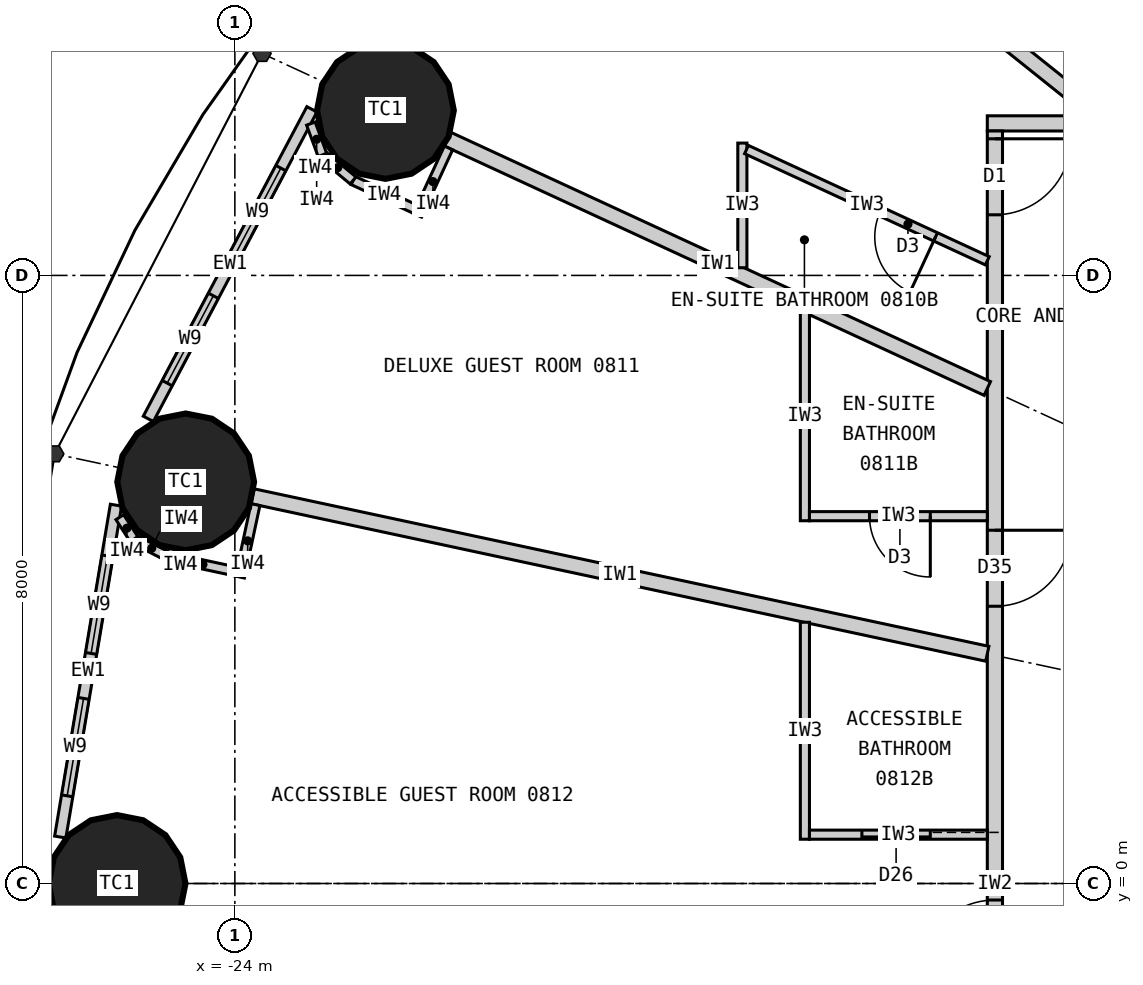
"""IFC4 building model, lengths in metres.
Left out: names, types, materials, properties, quantities, classifications, styles, units other than length and angle.
Written with IfcOpenShell. Run it as: python <this file> out.ifc"""

import sys

from ifc_helpers import new_model, si_unit, direction, frame, frame_2d, origin, origin_2d, place, context, subcontext, project, spatial, rectangle, circle, extrude, element, fill, save


model = new_model("IFC4")
c1 = context("Model", 3, precision=1e-05, world=origin(), true_north=direction((0.0, 1.0)))
c2 = subcontext(c1, "Body", "Model", "MODEL_VIEW")
j1 = project(units=[si_unit("LENGTHUNIT", "METRE"), si_unit("PLANEANGLEUNIT", "RADIAN")], contexts=[c1])
p1 = place(None, origin())
s1 = spatial("IfcSite", under=j1, at=p1, CompositionType="ELEMENT")
p2 = place(p1, origin())
s2 = spatial("IfcBuilding", under=s1, at=p2, CompositionType="ELEMENT")
p3 = place(p2, frame((0.0, 0.0, 39.3)))
s3 = spatial("IfcBuildingStorey", under=s2, at=p3, CompositionType="ELEMENT", Elevation=39.3)
for number, where, z_axis, x_axis in (
    (1, (-22.019, 10.17, 0.0), (0.0, 0.0, 1.0), (1.0, 0.0, 0.0)),
    (2, (-24.647, 5.283, 0.0), (0.0, 0.0, 1.0), (1.0, 0.0, 0.0)),
    (3, (-25.55, 0.0, 0.0), (0.0, 0.0, 1.0), (1.0, 0.0, 0.0)),
):
    element("IfcColumn", number, at=place(p3, frame(where, z_axis=z_axis, x_axis=x_axis)), inside=s3, PredefinedType="COLUMN", context=c2, shape_type="SweptSolid", body=[
        extrude(circle(Radius=0.9, at=origin_2d()), origin(), (0.0, 0.0, 1.0), 3.3),
    ])
p4 = place(p3, frame((-22.986, 10.185, 0.0), z_axis=(0.0, 0.0, 1.0), x_axis=(-0.467303182954, -0.884097129959, 0.0)))
e4 = element("IfcWall", 4, at=p4, inside=s3, PredefinedType="ELEMENTEDWALL", context=c2, shape_type="SweptSolid", body=[
    extrude(rectangle(XDim=4.606, YDim=0.15, at=frame_2d((2.303, 0.0))), origin(), (0.0, 0.0, 1.0), 3.12),
])
p5 = place(p4, frame((0.875, 0.0, 0.9)))
e5 = element("IfcOpeningElement", 5, at=p5, cuts=e4, PredefinedType="OPENING", context=c2, shape_type="SweptSolid", body=[
    extrude(rectangle(XDim=1.3, YDim=1.9, at=frame_2d((0.65, 0.95))), frame((0.0, 0.085, 0.0), z_axis=(0.0, -1.0, 0.0), x_axis=(1.0, 0.0, 0.0)), (0.0, 0.0, 1.0), 0.17),
])
p6 = place(p4, frame((2.775, 0.0, 0.9)))
e6 = element("IfcOpeningElement", 6, at=p6, cuts=e4, PredefinedType="OPENING", context=c2, shape_type="SweptSolid", body=[
    extrude(rectangle(XDim=1.3, YDim=1.9, at=frame_2d((0.65, 0.95))), frame((0.0, 0.085, 0.0), z_axis=(0.0, -1.0, 0.0), x_axis=(1.0, 0.0, 0.0)), (0.0, 0.0, 1.0), 0.17),
])
p7 = place(p3, frame((-25.564, 4.978, 0.0), z_axis=(0.0, 0.0, 1.0), x_axis=(-0.165641751141, -0.986185991727, 0.0)))
e7 = element("IfcWall", 7, at=p7, inside=s3, PredefinedType="ELEMENTEDWALL", context=c2, shape_type="SweptSolid", body=[
    extrude(rectangle(XDim=4.428, YDim=0.15, at=frame_2d((2.214, 0.0))), origin(), (0.0, 0.0, 1.0), 3.12),
])
p8 = place(p7, frame((0.678, 0.0, 0.9)))
e8 = element("IfcOpeningElement", 8, at=p8, cuts=e7, PredefinedType="OPENING", context=c2, shape_type="SweptSolid", body=[
    extrude(rectangle(XDim=1.3, YDim=1.9, at=frame_2d((0.65, 0.95))), frame((0.0, 0.085, 0.0), z_axis=(0.0, -1.0, 0.0), x_axis=(1.0, 0.0, 0.0)), (0.0, 0.0, 1.0), 0.17),
])
p9 = place(p7, frame((2.578, 0.0, 0.9)))
e9 = element("IfcOpeningElement", 9, at=p9, cuts=e7, PredefinedType="OPENING", context=c2, shape_type="SweptSolid", body=[
    extrude(rectangle(XDim=1.3, YDim=1.9, at=frame_2d((0.65, 0.95))), frame((0.0, 0.085, 0.0), z_axis=(0.0, -1.0, 0.0), x_axis=(1.0, 0.0, 0.0)), (0.0, 0.0, 1.0), 0.17),
])
p10 = place(p3, frame((-14.1, 10.0, 0.0), z_axis=(0.0, 0.0, 1.0), x_axis=(1.0, 0.0, 0.0)))
e10 = element("IfcWall", 10, at=p10, inside=s3, PredefinedType="PARTITIONING", context=c2, shape_type="SweptSolid", body=[
    extrude(rectangle(XDim=28.2, YDim=0.2, at=frame_2d((14.1, 0.0))), origin(), (0.0, 0.0, 1.0), 3.12),
])
p11 = place(p10, frame((23.477, 0.0, 0.0)))
e11 = element("IfcOpeningElement", 11, at=p11, cuts=e10, PredefinedType="OPENING", context=c2, shape_type="SweptSolid", body=[
    extrude(rectangle(XDim=1.0, YDim=2.2, at=frame_2d((0.5, 1.1))), frame((0.0, 0.11, 0.0), z_axis=(0.0, -1.0, 0.0), x_axis=(1.0, 0.0, 0.0)), (0.0, 0.0, 1.0), 0.22),
])
p12 = place(p10, frame((18.529, 0.0, 0.0)))
e12 = element("IfcOpeningElement", 12, at=p12, cuts=e10, PredefinedType="OPENING", context=c2, shape_type="SweptSolid", body=[
    extrude(rectangle(XDim=1.0, YDim=2.2, at=frame_2d((0.5, 1.1))), frame((0.0, 0.11, 0.0), z_axis=(0.0, -1.0, 0.0), x_axis=(1.0, 0.0, 0.0)), (0.0, 0.0, 1.0), 0.22),
])
p13 = place(p10, frame((14.623, 0.0, 0.0)))
e13 = element("IfcOpeningElement", 13, at=p13, cuts=e10, PredefinedType="OPENING", context=c2, shape_type="SweptSolid", body=[
    extrude(rectangle(XDim=1.0, YDim=2.2, at=frame_2d((0.5, 1.1))), frame((0.0, 0.11, 0.0), z_axis=(0.0, -1.0, 0.0), x_axis=(1.0, 0.0, 0.0)), (0.0, 0.0, 1.0), 0.22),
])
p14 = place(p10, frame((11.252, 0.0, 0.0)))
e14 = element("IfcOpeningElement", 14, at=p14, cuts=e10, PredefinedType="OPENING", context=c2, shape_type="SweptSolid", body=[
    extrude(rectangle(XDim=1.0, YDim=2.1, at=frame_2d((0.5, 1.05))), frame((0.0, 0.11, 0.0), z_axis=(0.0, -1.0, 0.0), x_axis=(1.0, 0.0, 0.0)), (0.0, 0.0, 1.0), 0.22),
])
p15 = place(p10, frame((8.671, 0.0, 0.0)))
e15 = element("IfcOpeningElement", 15, at=p15, cuts=e10, PredefinedType="OPENING", context=c2, shape_type="SweptSolid", body=[
    extrude(rectangle(XDim=1.0, YDim=2.2, at=frame_2d((0.5, 1.1))), frame((0.0, 0.11, 0.0), z_axis=(0.0, -1.0, 0.0), x_axis=(1.0, 0.0, 0.0)), (0.0, 0.0, 1.0), 0.22),
])
p16 = place(p10, frame((1.616, 0.0, 0.0)))
e16 = element("IfcOpeningElement", 16, at=p16, cuts=e10, PredefinedType="OPENING", context=c2, shape_type="SweptSolid", body=[
    extrude(rectangle(XDim=1.0, YDim=2.2, at=frame_2d((0.5, 1.1))), frame((0.0, 0.11, 0.0), z_axis=(0.0, -1.0, 0.0), x_axis=(1.0, 0.0, 0.0)), (0.0, 0.0, 1.0), 0.22),
])
p17 = place(p3, frame((-14.0, 9.9, 0.0), z_axis=(0.0, 0.0, 1.0), x_axis=(0.0, -1.0, 0.0)))
e17 = element("IfcWall", 17, at=p17, inside=s3, PredefinedType="PARTITIONING", context=c2, shape_type="SweptSolid", body=[
    extrude(rectangle(XDim=19.8, YDim=0.2, at=frame_2d((9.9, 0.0))), origin(), (0.0, 0.0, 1.0), 3.12),
])
p18 = place(p17, frame((0.103, 0.0, 0.0)))
e18 = element("IfcOpeningElement", 18, at=p18, cuts=e17, PredefinedType="OPENING", context=c2, shape_type="SweptSolid", body=[
    extrude(rectangle(XDim=1.0, YDim=2.2, at=frame_2d((0.5, 1.1))), frame((0.0, 0.11, 0.0), z_axis=(0.0, -1.0, 0.0), x_axis=(1.0, 0.0, 0.0)), (0.0, 0.0, 1.0), 0.22),
])
p19 = place(p17, frame((5.252, 0.0, 0.0)))
e19 = element("IfcOpeningElement", 19, at=p19, cuts=e17, PredefinedType="OPENING", context=c2, shape_type="SweptSolid", body=[
    extrude(rectangle(XDim=1.0, YDim=2.0, at=frame_2d((0.5, 1.0))), frame((0.0, 0.11, 0.0), z_axis=(0.0, -1.0, 0.0), x_axis=(1.0, 0.0, 0.0)), (0.0, 0.0, 1.0), 0.22),
])
p20 = place(p17, frame((10.117, 0.0, 0.0)))
e20 = element("IfcOpeningElement", 20, at=p20, cuts=e17, PredefinedType="OPENING", context=c2, shape_type="SweptSolid", body=[
    extrude(rectangle(XDim=1.0, YDim=2.2, at=frame_2d((0.5, 1.1))), frame((0.0, 0.11, 0.0), z_axis=(0.0, -1.0, 0.0), x_axis=(1.0, 0.0, 0.0)), (0.0, 0.0, 1.0), 0.22),
])
p21 = place(p17, frame((13.247, 0.0, 0.0)))
e21 = element("IfcOpeningElement", 21, at=p21, cuts=e17, PredefinedType="OPENING", context=c2, shape_type="SweptSolid", body=[
    extrude(rectangle(XDim=1.0, YDim=2.0, at=frame_2d((0.5, 1.0))), frame((0.0, 0.11, 0.0), z_axis=(0.0, -1.0, 0.0), x_axis=(1.0, 0.0, 0.0)), (0.0, 0.0, 1.0), 0.22),
])
p22 = place(p17, frame((15.679, 0.0, 0.0)))
e22 = element("IfcOpeningElement", 22, at=p22, cuts=e17, PredefinedType="OPENING", context=c2, shape_type="SweptSolid", body=[
    extrude(rectangle(XDim=1.0, YDim=2.2, at=frame_2d((0.5, 1.1))), frame((0.0, 0.11, 0.0), z_axis=(0.0, -1.0, 0.0), x_axis=(1.0, 0.0, 0.0)), (0.0, 0.0, 1.0), 0.22),
])
p23 = place(p3, frame((-12.625, 10.1, 0.0), z_axis=(0.0, 0.0, 1.0), x_axis=(-0.780872884676, 0.624689953479, 0.0)))
e23 = element("IfcWall", 23, at=p23, inside=s3, PredefinedType="PARTITIONING", context=c2, shape_type="SweptSolid", body=[
    extrude(rectangle(XDim=5.845, YDim=0.2, at=frame_2d((2.922, 0.0))), origin(), (0.0, 0.0, 1.0), 2.32),
])
p24 = place(p3, frame((-14.1, 6.512, 0.0), z_axis=(0.0, 0.0, 1.0), x_axis=(-0.907842433118, 0.41931147925, 0.0)))
e24 = element("IfcWall", 24, at=p24, inside=s3, PredefinedType="PARTITIONING", context=c2, shape_type="SweptSolid", body=[
    extrude(rectangle(XDim=7.823, YDim=0.2, at=frame_2d((3.912, 0.0))), origin(), (0.0, 0.0, 1.0), 2.32),
])
p25 = place(p3, frame((-14.1, 3.022, 0.0), z_axis=(0.0, 0.0, 1.0), x_axis=(-0.977786510688, 0.209603290805, 0.0)))
e25 = element("IfcWall", 25, at=p25, inside=s3, PredefinedType="PARTITIONING", context=c2, shape_type="SweptSolid", body=[
    extrude(rectangle(XDim=9.887, YDim=0.2, at=frame_2d((4.943, 0.0))), origin(), (0.0, 0.0, 1.0), 2.32),
])
p26 = place(p3, frame((-17.323, 8.101, 0.0), z_axis=(0.0, 0.0, 1.0), x_axis=(0.0, 1.0, 0.0)))
e26 = element("IfcWall", 26, at=p26, inside=s3, PredefinedType="PARTITIONING", context=c2, shape_type="SweptSolid", body=[
    extrude(rectangle(XDim=1.64, YDim=0.12, at=frame_2d((0.82, 0.0))), origin(), (0.0, 0.0, 1.0), 3.12),
])
p27 = place(p3, frame((-14.1, 8.193, 0.0), z_axis=(0.0, 0.0, 1.0), x_axis=(-0.907836493557, 0.419324338628, 0.0)))
e27 = element("IfcWall", 27, at=p27, inside=s3, PredefinedType="PARTITIONING", context=c2, shape_type="SweptSolid", body=[
    extrude(rectangle(XDim=3.49, YDim=0.12, at=frame_2d((1.745, 0.0))), origin(), (0.0, 0.0, 1.0), 3.12),
])
p28 = place(p27, frame((0.75, 0.0, 0.0)))
e28 = element("IfcOpeningElement", 28, at=p28, cuts=e27, PredefinedType="OPENING", context=c2, shape_type="SweptSolid", body=[
    extrude(rectangle(XDim=0.8, YDim=2.1, at=frame_2d((0.4, 1.05))), frame((0.0, 0.07, 0.0), z_axis=(0.0, -1.0, 0.0), x_axis=(1.0, 0.0, 0.0)), (0.0, 0.0, 1.0), 0.14),
])
p29 = place(p3, frame((-16.5, 7.521, 0.0), z_axis=(0.0, 0.0, 1.0), x_axis=(0.0, -1.0, 0.0)))
e29 = element("IfcWall", 29, at=p29, inside=s3, PredefinedType="PARTITIONING", context=c2, shape_type="SweptSolid", body=[
    extrude(rectangle(XDim=2.749, YDim=0.12, at=frame_2d((1.374, 0.0))), origin(), (0.0, 0.0, 1.0), 3.12),
])
p30 = place(p3, frame((-14.1, 4.833, 0.0), z_axis=(0.0, 0.0, 1.0), x_axis=(-1.0, 0.0, 0.0)))
e30 = element("IfcWall", 30, at=p30, inside=s3, PredefinedType="PARTITIONING", context=c2, shape_type="SweptSolid", body=[
    extrude(rectangle(XDim=2.34, YDim=0.12, at=frame_2d((1.17, 0.0))), origin(), (0.0, 0.0, 1.0), 3.12),
])
p31 = place(p30, frame((0.75, 0.0, 0.0)))
e31 = element("IfcOpeningElement", 31, at=p31, cuts=e30, PredefinedType="OPENING", context=c2, shape_type="SweptSolid", body=[
    extrude(rectangle(XDim=0.8, YDim=2.1, at=frame_2d((0.4, 1.05))), frame((0.0, 0.07, 0.0), z_axis=(0.0, -1.0, 0.0), x_axis=(1.0, 0.0, 0.0)), (0.0, 0.0, 1.0), 0.14),
])
p32 = place(p3, frame((-16.5, 3.437, 0.0), z_axis=(0.0, 0.0, 1.0), x_axis=(0.0, -1.0, 0.0)))
e32 = element("IfcWall", 32, at=p32, inside=s3, PredefinedType="PARTITIONING", context=c2, shape_type="SweptSolid", body=[
    extrude(rectangle(XDim=2.854, YDim=0.12, at=frame_2d((1.427, 0.0))), origin(), (0.0, 0.0, 1.0), 3.12),
])
p33 = place(p3, frame((-14.1, 0.643, 0.0), z_axis=(0.0, 0.0, 1.0), x_axis=(-1.0, 0.0, 0.0)))
e33 = element("IfcWall", 33, at=p33, inside=s3, PredefinedType="PARTITIONING", context=c2, shape_type="SweptSolid", body=[
    extrude(rectangle(XDim=2.34, YDim=0.12, at=frame_2d((1.17, 0.0))), origin(), (0.0, 0.0, 1.0), 3.12),
])
p34 = place(p33, frame((0.75, 0.0, 0.0)))
e34 = element("IfcOpeningElement", 34, at=p34, cuts=e33, PredefinedType="OPENING", context=c2, shape_type="SweptSolid", body=[
    extrude(rectangle(XDim=0.9, YDim=2.1, at=frame_2d((0.45, 1.05))), frame((0.0, 0.07, 0.0), z_axis=(0.0, -1.0, 0.0), x_axis=(1.0, 0.0, 0.0)), (0.0, 0.0, 1.0), 0.14),
])
p35 = place(p3, frame((-21.189, 9.677, 0.0), z_axis=(0.0, 0.0, 1.0), x_axis=(-0.419344098106, -0.907827366509, 0.0)))
e35 = element("IfcWall", 35, at=p35, inside=s3, PredefinedType="PARTITIONING", context=c2, shape_type="SweptSolid", body=[
    extrude(rectangle(XDim=0.975, YDim=0.12, at=frame_2d((0.487, 0.0))), origin(), (0.0, 0.0, 1.0), 3.12),
])
p36 = place(p3, frame((-21.627, 8.872, 0.0), z_axis=(0.0, 0.0, 1.0), x_axis=(-0.907935564339, 0.419109783957, 0.0)))
e36 = element("IfcWall", 36, at=p36, inside=s3, PredefinedType="PARTITIONING", context=c2, shape_type="SweptSolid", body=[
    extrude(rectangle(XDim=0.9, YDim=0.12, at=frame_2d((0.45, 0.0))), origin(), (0.0, 0.0, 1.0), 3.12),
])
p37 = place(p3, frame((-22.445, 9.249, 0.0), z_axis=(0.0, 0.0, 1.0), x_axis=(-0.768335565584, 0.640047231584, 0.0)))
e37 = element("IfcWall", 37, at=p37, inside=s3, PredefinedType="PARTITIONING", context=c2, shape_type="SweptSolid", body=[
    extrude(rectangle(XDim=0.525, YDim=0.12, at=frame_2d((0.263, 0.0))), origin(), (0.0, 0.0, 1.0), 3.12),
])
p38 = place(p3, frame((-22.848, 9.585, 0.0), z_axis=(0.0, 0.0, 1.0), x_axis=(-0.345267312673, 0.938504386138, 0.0)))
e38 = element("IfcWall", 38, at=p38, inside=s3, PredefinedType="PARTITIONING", context=c2, shape_type="SweptSolid", body=[
    extrude(rectangle(XDim=0.439, YDim=0.12, at=frame_2d((0.22, 0.0))), origin(), (0.0, 0.0, 1.0), 3.12),
])
p39 = place(p3, frame((-23.729, 4.984, 0.0), z_axis=(0.0, 0.0, 1.0), x_axis=(-0.20968306268, -0.977769406979, 0.0)))
e39 = element("IfcWall", 39, at=p39, inside=s3, PredefinedType="PARTITIONING", context=c2, shape_type="SweptSolid", body=[
    extrude(rectangle(XDim=0.975, YDim=0.12, at=frame_2d((0.487, 0.0))), origin(), (0.0, 0.0, 1.0), 3.12),
])
p40 = place(p3, frame((-23.98, 4.103, 0.0), z_axis=(0.0, 0.0, 1.0), x_axis=(-0.977762694187, 0.209714362543, 0.0)))
e40 = element("IfcWall", 40, at=p40, inside=s3, PredefinedType="PARTITIONING", context=c2, shape_type="SweptSolid", body=[
    extrude(rectangle(XDim=0.9, YDim=0.12, at=frame_2d((0.45, 0.0))), origin(), (0.0, 0.0, 1.0), 3.12),
])
p41 = place(p3, frame((-24.86, 4.291, 0.0), z_axis=(0.0, 0.0, 1.0), x_axis=(-0.890204323062, 0.455561481254, 0.0)))
e41 = element("IfcWall", 41, at=p41, inside=s3, PredefinedType="PARTITIONING", context=c2, shape_type="SweptSolid", body=[
    extrude(rectangle(XDim=0.525, YDim=0.12, at=frame_2d((0.263, 0.0))), origin(), (0.0, 0.0, 1.0), 3.12),
])
p42 = place(p3, frame((-25.327, 4.531, 0.0), z_axis=(0.0, 0.0, 1.0), x_axis=(-0.543516034791, 0.839398784801, 0.0)))
e42 = element("IfcWall", 42, at=p42, inside=s3, PredefinedType="PARTITIONING", context=c2, shape_type="SweptSolid", body=[
    extrude(rectangle(XDim=0.344, YDim=0.12, at=frame_2d((0.172, 0.0))), origin(), (0.0, 0.0, 1.0), 3.12),
])
p43 = place(p5, origin())
e43 = element("IfcWindow", 43, at=p43, inside=s3, PartitioningType="SINGLE_PANEL", PredefinedType="WINDOW", context=c2, shape_type="SweptSolid", body=[
    extrude(rectangle(XDim=1.3, YDim=1.9, at=frame_2d((0.65, 0.95))), frame((0.0, 0.03, 0.0), z_axis=(0.0, -1.0, 0.0), x_axis=(1.0, 0.0, 0.0)), (0.0, 0.0, 1.0), 0.06),
])
fill(e5, e43)
p44 = place(p6, origin())
e44 = element("IfcWindow", 44, at=p44, inside=s3, PartitioningType="SINGLE_PANEL", PredefinedType="WINDOW", context=c2, shape_type="SweptSolid", body=[
    extrude(rectangle(XDim=1.3, YDim=1.9, at=frame_2d((0.65, 0.95))), frame((0.0, 0.03, 0.0), z_axis=(0.0, -1.0, 0.0), x_axis=(1.0, 0.0, 0.0)), (0.0, 0.0, 1.0), 0.06),
])
fill(e6, e44)
p45 = place(p8, origin())
e45 = element("IfcWindow", 45, at=p45, inside=s3, PartitioningType="SINGLE_PANEL", PredefinedType="WINDOW", context=c2, shape_type="SweptSolid", body=[
    extrude(rectangle(XDim=1.3, YDim=1.9, at=frame_2d((0.65, 0.95))), frame((0.0, 0.03, 0.0), z_axis=(0.0, -1.0, 0.0), x_axis=(1.0, 0.0, 0.0)), (0.0, 0.0, 1.0), 0.06),
])
fill(e8, e45)
p46 = place(p9, origin())
e46 = element("IfcWindow", 46, at=p46, inside=s3, PartitioningType="SINGLE_PANEL", PredefinedType="WINDOW", context=c2, shape_type="SweptSolid", body=[
    extrude(rectangle(XDim=1.3, YDim=1.9, at=frame_2d((0.65, 0.95))), frame((0.0, 0.03, 0.0), z_axis=(0.0, -1.0, 0.0), x_axis=(1.0, 0.0, 0.0)), (0.0, 0.0, 1.0), 0.06),
])
fill(e9, e46)
p47 = place(p28, origin())
e47 = element("IfcDoor", 47, at=p47, inside=s3, OperationType="SINGLE_SWING_LEFT", PredefinedType="DOOR", context=c2, shape_type="SweptSolid", body=[
    extrude(rectangle(XDim=0.8, YDim=2.1, at=frame_2d((0.4, 1.05))), frame((0.0, 0.025, 0.0), z_axis=(0.0, -1.0, 0.0), x_axis=(1.0, 0.0, 0.0)), (0.0, 0.0, 1.0), 0.05),
])
fill(e28, e47)
p48 = place(p18, origin())
e48 = element("IfcDoor", 48, at=p48, inside=s3, OperationType="SINGLE_SWING_LEFT", PredefinedType="DOOR", context=c2, shape_type="SweptSolid", body=[
    extrude(rectangle(XDim=1.0, YDim=2.2, at=frame_2d((0.5, 1.1))), frame((0.0, 0.025, 0.0), z_axis=(0.0, -1.0, 0.0), x_axis=(1.0, 0.0, 0.0)), (0.0, 0.0, 1.0), 0.05),
])
fill(e18, e48)
p49 = place(p31, origin())
e49 = element("IfcDoor", 49, at=p49, inside=s3, OperationType="SINGLE_SWING_LEFT", PredefinedType="DOOR", context=c2, shape_type="SweptSolid", body=[
    extrude(rectangle(XDim=0.8, YDim=2.1, at=frame_2d((0.4, 1.05))), frame((0.0, 0.025, 0.0), z_axis=(0.0, -1.0, 0.0), x_axis=(1.0, 0.0, 0.0)), (0.0, 0.0, 1.0), 0.05),
])
fill(e31, e49)
p50 = place(p19, origin())
e50 = element("IfcDoor", 50, at=p50, inside=s3, OperationType="SINGLE_SWING_LEFT", PredefinedType="DOOR", context=c2, shape_type="SweptSolid", body=[
    extrude(rectangle(XDim=1.0, YDim=2.0, at=frame_2d((0.5, 1.0))), frame((0.0, 0.025, 0.0), z_axis=(0.0, -1.0, 0.0), x_axis=(1.0, 0.0, 0.0)), (0.0, 0.0, 1.0), 0.05),
])
fill(e19, e50)
p51 = place(p34, origin())
e51 = element("IfcDoor", 51, at=p51, inside=s3, OperationType="SLIDING_TO_LEFT", PredefinedType="DOOR", context=c2, shape_type="SweptSolid", body=[
    extrude(rectangle(XDim=0.9, YDim=2.1, at=frame_2d((0.45, 1.05))), frame((0.0, 0.025, 0.0), z_axis=(0.0, -1.0, 0.0), x_axis=(1.0, 0.0, 0.0)), (0.0, 0.0, 1.0), 0.05),
])
fill(e34, e51)
p52 = place(p20, origin())
e52 = element("IfcDoor", 52, at=p52, inside=s3, OperationType="SINGLE_SWING_RIGHT", PredefinedType="DOOR", context=c2, shape_type="SweptSolid", body=[
    extrude(rectangle(XDim=1.0, YDim=2.2, at=frame_2d((0.5, 1.1))), frame((0.0, 0.025, 0.0), z_axis=(0.0, -1.0, 0.0), x_axis=(1.0, 0.0, 0.0)), (0.0, 0.0, 1.0), 0.05),
])
fill(e20, e52)
save(model, sys.argv[1])
